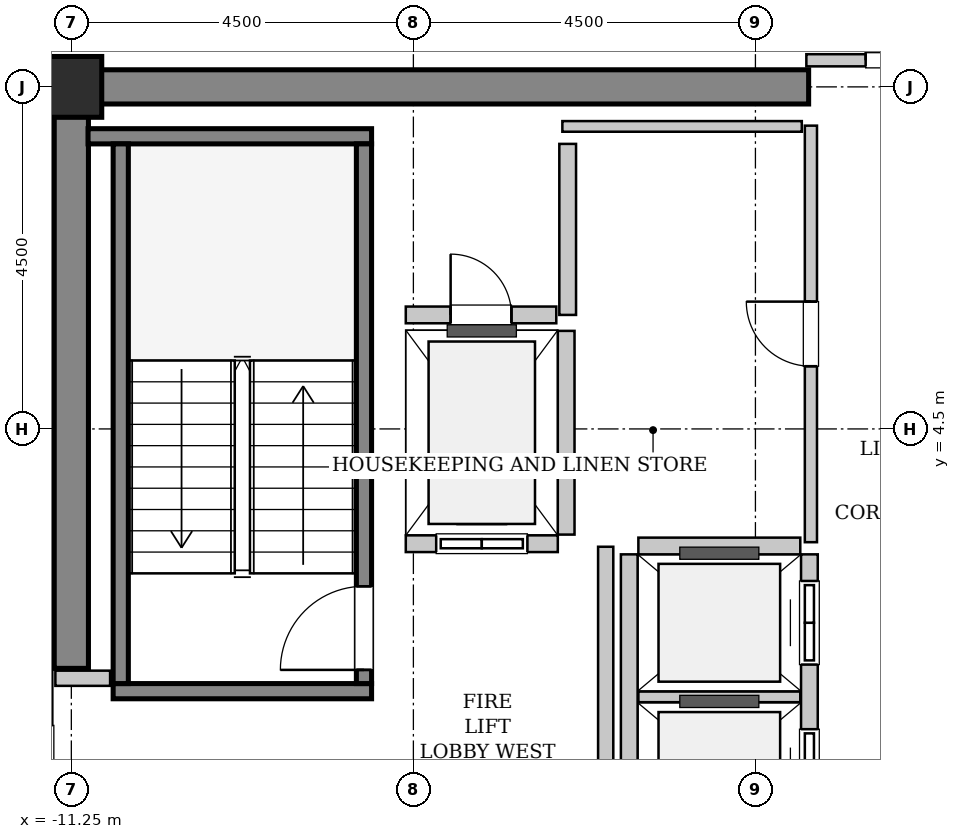
"""IFC4 building model, lengths in metres.
Left out: names, types, materials, properties, quantities, classifications, styles, units other than length and angle.
Written with IfcOpenShell. Run it as: python <this file> out.ifc"""

import sys

from ifc_helpers import new_model, si_unit, direction, frame, frame_2d, origin, origin_2d, place, context, subcontext, project, spatial, rectangle, hollow_rectangle, extrude, source, transform, mapped, element, fill, save


model = new_model("IFC4")
c1 = context("Model", 3, precision=1e-05, world=origin(), true_north=direction((0.0, 1.0)))
c2 = subcontext(c1, "Body", "Model", "MODEL_VIEW")
j1 = project(units=[si_unit("LENGTHUNIT", "METRE"), si_unit("PLANEANGLEUNIT", "RADIAN")], contexts=[c1])
p1 = place(None, origin())
s1 = spatial("IfcSite", under=j1, at=p1, CompositionType="ELEMENT")
p2 = place(p1, origin())
s2 = spatial("IfcBuilding", under=s1, at=p2, CompositionType="ELEMENT")
p3 = place(p2, frame((0.0, 0.0, 291.2)))
s3 = spatial("IfcBuildingStorey", under=s2, at=p3, CompositionType="ELEMENT", Elevation=291.2)
m1 = source(origin(), c2, "Body", "SweptSolid", [
    extrude(rectangle(XDim=9.925, YDim=0.45, at=frame_2d((4.962, 0.0))), origin(), (0.0, 0.0, 1.0), 3.8),
])
p4 = place(p3, frame((-11.475, 9.0, 0.0), z_axis=(0.0, 0.0, 1.0), x_axis=(1.0, 0.0, 0.0)))
e1 = element("IfcWall", 1, at=p4, inside=s3, PredefinedType="SHEAR", context=c2, shape_type="MappedRepresentation", body=[
    mapped(m1, transform((0.0, 0.0, 0.0), x_axis=(1.0, 0.0, 0.0), y_axis=(0.0, 1.0, 0.0), z_axis=(0.0, 0.0, 1.0), scale=1.0)),
])
m2 = source(origin(), c2, "Body", "SweptSolid", [
    extrude(rectangle(XDim=7.425, YDim=0.45, at=frame_2d((3.712, 0.0))), origin(), (0.0, 0.0, 1.0), 3.8),
])
p5 = place(p3, frame((-11.25, 1.35, 0.0), z_axis=(0.0, 0.0, 1.0), x_axis=(0.0, 1.0, 0.0)))
e2 = element("IfcWall", 2, at=p5, inside=s3, PredefinedType="SHEAR", context=c2, shape_type="MappedRepresentation", body=[
    mapped(m2, transform((0.0, 0.0, 0.0), x_axis=(1.0, 0.0, 0.0), y_axis=(0.0, 1.0, 0.0), z_axis=(0.0, 0.0, 1.0), scale=1.0)),
])
m3 = source(origin(), c2, "Body", "SweptSolid", [
    extrude(hollow_rectangle(XDim=0.8, YDim=0.8, WallThickness=0.04, InnerFilletRadius=0.04, OuterFilletRadius=0.08, at=origin_2d()), origin(), (0.0, 0.0, 1.0), 3.8),
])
p6 = place(p3, frame((-11.25, 9.0, 0.0), z_axis=(0.0, 0.0, 1.0), x_axis=(1.0, 0.0, 0.0)))
e3 = element("IfcColumn", 3, at=p6, inside=s3, PredefinedType="COLUMN", context=c2, shape_type="MappedRepresentation", body=[
    mapped(m3, transform((0.0, 0.0, 0.0), x_axis=(1.0, 0.0, 0.0), y_axis=(0.0, 1.0, 0.0), z_axis=(0.0, 0.0, 1.0), scale=1.0)),
])
m4 = source(origin(), c2, "Body", "SweptSolid", [
    extrude(rectangle(XDim=3.4, YDim=0.2, at=frame_2d((1.7, 0.0))), origin(), (0.0, 0.0, 1.0), 3.8),
])
p7 = place(p3, frame((-7.3, 1.05, 0.0), z_axis=(0.0, 0.0, 1.0), x_axis=(-1.0, 0.0, 0.0)))
e4 = element("IfcWall", 4, at=p7, inside=s3, PredefinedType="SOLIDWALL", context=c2, shape_type="MappedRepresentation", body=[
    mapped(m4, transform((0.0, 0.0, 0.0), x_axis=(1.0, 0.0, 0.0), y_axis=(0.0, 1.0, 0.0), z_axis=(0.0, 0.0, 1.0), scale=1.0)),
])
m5 = source(origin(), c2, "Body", "SweptSolid", [
    extrude(rectangle(XDim=3.73, YDim=0.2, at=frame_2d((1.865, 0.0))), origin(), (0.0, 0.0, 1.0), 3.8),
])
p8 = place(p3, frame((-7.3, 8.35, 0.0), z_axis=(0.0, 0.0, 1.0), x_axis=(-1.0, 0.0, 0.0)))
e5 = element("IfcWall", 5, at=p8, inside=s3, PredefinedType="SOLIDWALL", context=c2, shape_type="MappedRepresentation", body=[
    mapped(m5, transform((0.0, 0.0, 0.0), x_axis=(1.0, 0.0, 0.0), y_axis=(0.0, 1.0, 0.0), z_axis=(0.0, 0.0, 1.0), scale=1.0)),
])
m6 = source(origin(), c2, "Body", "SweptSolid", [
    extrude(rectangle(XDim=7.1, YDim=0.2, at=frame_2d((3.55, 0.0))), origin(), (0.0, 0.0, 1.0), 3.8),
])
p9 = place(p3, frame((-7.4, 1.15, 0.0), z_axis=(0.0, 0.0, 1.0), x_axis=(0.0, 1.0, 0.0)))
e6 = element("IfcWall", 6, at=p9, inside=s3, PredefinedType="SOLIDWALL", context=c2, shape_type="MappedRepresentation", body=[
    mapped(m6, transform((0.0, 0.0, 0.0), x_axis=(1.0, 0.0, 0.0), y_axis=(0.0, 1.0, 0.0), z_axis=(0.0, 0.0, 1.0), scale=1.0)),
])
p10 = place(p9, frame((0.18, 0.0, 0.0)))
e7 = element("IfcOpeningElement", 7, at=p10, cuts=e6, PredefinedType="OPENING", context=c2, shape_type="SweptSolid", body=[
    extrude(rectangle(XDim=1.1, YDim=2.15, at=frame_2d((0.55, 1.075))), frame((0.0, 0.11, 0.0), z_axis=(0.0, -1.0, 0.0), x_axis=(1.0, 0.0, 0.0)), (0.0, 0.0, 1.0), 0.22),
])
p11 = place(p3, frame((-10.6, 1.15, 0.0), z_axis=(0.0, 0.0, 1.0), x_axis=(0.0, 1.0, 0.0)))
e8 = element("IfcWall", 8, at=p11, inside=s3, PredefinedType="SOLIDWALL", context=c2, shape_type="MappedRepresentation", body=[
    mapped(m6, transform((0.0, 0.0, 0.0), x_axis=(1.0, 0.0, 0.0), y_axis=(0.0, 1.0, 0.0), z_axis=(0.0, 0.0, 1.0), scale=1.0)),
])
m7 = source(origin(), c2, "Body", "SweptSolid", [
    extrude(rectangle(XDim=2.0, YDim=0.22, at=frame_2d((1.0, 0.0))), origin(), (0.0, 0.0, 1.0), 3.535),
])
p12 = place(p3, frame((-6.85, 2.99, 0.0), z_axis=(0.0, 0.0, 1.0), x_axis=(1.0, 0.0, 0.0)))
e9 = element("IfcWall", 9, at=p12, inside=s3, PredefinedType="SOLIDWALL", context=c2, shape_type="MappedRepresentation", body=[
    mapped(m7, transform((0.0, 0.0, 0.0), x_axis=(1.0, 0.0, 0.0), y_axis=(0.0, 1.0, 0.0), z_axis=(0.0, 0.0, 1.0), scale=1.0)),
])
p13 = place(p12, frame((0.4, 0.0, 0.0)))
e10 = element("IfcOpeningElement", 10, at=p13, cuts=e9, PredefinedType="OPENING", context=c2, shape_type="SweptSolid", body=[
    extrude(rectangle(XDim=1.2, YDim=2.2, at=frame_2d((0.6, 1.1))), frame((0.0, 0.12, 0.0), z_axis=(0.0, -1.0, 0.0), x_axis=(1.0, 0.0, 0.0)), (0.0, 0.0, 1.0), 0.24),
])
m8 = source(origin(), c2, "Body", "SweptSolid", [
    extrude(rectangle(XDim=2.68, YDim=0.22, at=frame_2d((1.34, 0.0))), origin(), (0.0, 0.0, 1.0), 3.535),
])
p14 = place(p3, frame((-4.74, 3.11, 0.0), z_axis=(0.0, 0.0, 1.0), x_axis=(0.0, 1.0, 0.0)))
e11 = element("IfcWall", 11, at=p14, inside=s3, PredefinedType="SOLIDWALL", context=c2, shape_type="MappedRepresentation", body=[
    mapped(m8, transform((0.0, 0.0, 0.0), x_axis=(1.0, 0.0, 0.0), y_axis=(0.0, 1.0, 0.0), z_axis=(0.0, 0.0, 1.0), scale=1.0)),
])
m9 = source(origin(), c2, "Body", "SweptSolid", [
    extrude(rectangle(XDim=5.7, YDim=0.22, at=frame_2d((2.85, 0.0))), origin(), (0.0, 0.0, 1.0), 3.535),
])
p15 = place(p3, frame((-1.54, -2.85, 0.0), z_axis=(0.0, 0.0, 1.0), x_axis=(0.0, 1.0, 0.0)))
e12 = element("IfcWall", 12, at=p15, inside=s3, PredefinedType="SOLIDWALL", context=c2, shape_type="MappedRepresentation", body=[
    mapped(m9, transform((0.0, 0.0, 0.0), x_axis=(1.0, 0.0, 0.0), y_axis=(0.0, 1.0, 0.0), z_axis=(0.0, 0.0, 1.0), scale=1.0)),
])
p16 = place(p15, frame((0.35, 0.0, 0.0)))
e13 = element("IfcOpeningElement", 13, at=p16, cuts=e12, PredefinedType="OPENING", context=c2, shape_type="SweptSolid", body=[
    extrude(rectangle(XDim=1.1, YDim=2.2, at=frame_2d((0.55, 1.1))), frame((0.0, 0.12, 0.0), z_axis=(0.0, -1.0, 0.0), x_axis=(1.0, 0.0, 0.0)), (0.0, 0.0, 1.0), 0.24),
])
p17 = place(p15, frame((2.3, 0.0, 0.0)))
e14 = element("IfcOpeningElement", 14, at=p17, cuts=e12, PredefinedType="OPENING", context=c2, shape_type="SweptSolid", body=[
    extrude(rectangle(XDim=1.1, YDim=2.2, at=frame_2d((0.55, 1.1))), frame((0.0, 0.12, 0.0), z_axis=(0.0, -1.0, 0.0), x_axis=(1.0, 0.0, 0.0)), (0.0, 0.0, 1.0), 0.24),
])
p18 = place(p15, frame((4.25, 0.0, 0.0)))
e15 = element("IfcOpeningElement", 15, at=p18, cuts=e12, PredefinedType="OPENING", context=c2, shape_type="SweptSolid", body=[
    extrude(rectangle(XDim=1.1, YDim=2.2, at=frame_2d((0.55, 1.1))), frame((0.0, 0.12, 0.0), z_axis=(0.0, -1.0, 0.0), x_axis=(1.0, 0.0, 0.0)), (0.0, 0.0, 1.0), 0.24),
])
p19 = place(p3, frame((-3.91, 2.85, 0.0), z_axis=(0.0, 0.0, 1.0), x_axis=(0.0, -1.0, 0.0)))
e16 = element("IfcWall", 16, at=p19, inside=s3, PredefinedType="SOLIDWALL", context=c2, shape_type="MappedRepresentation", body=[
    mapped(m9, transform((0.0, 0.0, 0.0), x_axis=(1.0, 0.0, 0.0), y_axis=(0.0, 1.0, 0.0), z_axis=(0.0, 0.0, 1.0), scale=1.0)),
])
m10 = source(origin(), c2, "Body", "SweptSolid", [
    extrude(rectangle(XDim=2.13, YDim=0.14, at=frame_2d((1.065, 0.0))), origin(), (0.0, 0.0, 1.0), 3.535),
])
p20 = place(p3, frame((-3.79, 0.975, 0.0), z_axis=(0.0, 0.0, 1.0), x_axis=(1.0, 0.0, 0.0)))
e17 = element("IfcWall", 17, at=p20, inside=s3, PredefinedType="PARTITIONING", context=c2, shape_type="MappedRepresentation", body=[
    mapped(m10, transform((0.0, 0.0, 0.0), x_axis=(1.0, 0.0, 0.0), y_axis=(0.0, 1.0, 0.0), z_axis=(0.0, 0.0, 1.0), scale=1.0)),
])
m11 = source(origin(), c2, "Body", "SweptSolid", [
    extrude(rectangle(XDim=2.13, YDim=0.22, at=frame_2d((1.065, 0.0))), origin(), (0.0, 0.0, 1.0), 3.535),
])
p21 = place(p3, frame((-1.66, 2.96, 0.0), z_axis=(0.0, 0.0, 1.0), x_axis=(-1.0, 0.0, 0.0)))
e18 = element("IfcWall", 18, at=p21, inside=s3, PredefinedType="SOLIDWALL", context=c2, shape_type="MappedRepresentation", body=[
    mapped(m11, transform((0.0, 0.0, 0.0), x_axis=(1.0, 0.0, 0.0), y_axis=(0.0, 1.0, 0.0), z_axis=(0.0, 0.0, 1.0), scale=1.0)),
])
m12 = source(origin(), c2, "Body", "SweptSolid", [
    extrude(rectangle(XDim=2.25, YDim=0.22, at=frame_2d((1.125, 0.0))), origin(), (0.0, 0.0, 1.0), 3.535),
])
p22 = place(p3, frame((-4.72, 6.0, 0.0), z_axis=(0.0, 0.0, 1.0), x_axis=(0.0, 1.0, 0.0)))
e19 = element("IfcWall", 19, at=p22, inside=s3, PredefinedType="SOLIDWALL", context=c2, shape_type="MappedRepresentation", body=[
    mapped(m12, transform((0.0, 0.0, 0.0), x_axis=(1.0, 0.0, 0.0), y_axis=(0.0, 1.0, 0.0), z_axis=(0.0, 0.0, 1.0), scale=1.0)),
])
m13 = source(origin(), c2, "Body", "SweptSolid", [
    extrude(rectangle(XDim=1.98, YDim=0.22, at=frame_2d((0.99, 0.0))), origin(), (0.0, 0.0, 1.0), 3.535),
])
p23 = place(p3, frame((-6.85, 6.0, 0.0), z_axis=(0.0, 0.0, 1.0), x_axis=(1.0, 0.0, 0.0)))
e20 = element("IfcWall", 20, at=p23, inside=s3, PredefinedType="SOLIDWALL", context=c2, shape_type="MappedRepresentation", body=[
    mapped(m13, transform((0.0, 0.0, 0.0), x_axis=(1.0, 0.0, 0.0), y_axis=(0.0, 1.0, 0.0), z_axis=(0.0, 0.0, 1.0), scale=1.0)),
])
p24 = place(p23, frame((0.59, 0.0, 0.0)))
e21 = element("IfcOpeningElement", 21, at=p24, cuts=e20, PredefinedType="OPENING", context=c2, shape_type="SweptSolid", body=[
    extrude(rectangle(XDim=0.8, YDim=2.0, at=frame_2d((0.4, 1.0))), frame((0.0, 0.12, 0.0), z_axis=(0.0, -1.0, 0.0), x_axis=(1.0, 0.0, 0.0)), (0.0, 0.0, 1.0), 0.24),
])
m14 = source(origin(), c2, "Body", "SweptSolid", [
    extrude(rectangle(XDim=5.9, YDim=0.2, at=frame_2d((2.95, 0.0))), origin(), (0.0, 0.0, 1.0), 3.535),
])
p25 = place(p3, frame((-4.22, -2.95, 0.0), z_axis=(0.0, 0.0, 1.0), x_axis=(0.0, 1.0, 0.0)))
e22 = element("IfcWall", 22, at=p25, inside=s3, PredefinedType="PARTITIONING", context=c2, shape_type="MappedRepresentation", body=[
    mapped(m14, transform((0.0, 0.0, 0.0), x_axis=(1.0, 0.0, 0.0), y_axis=(0.0, 1.0, 0.0), z_axis=(0.0, 0.0, 1.0), scale=1.0)),
])
m15 = source(origin(), c2, "Body", "SweptSolid", [
    extrude(rectangle(XDim=0.72, YDim=0.2, at=frame_2d((0.36, 0.0))), origin(), (0.0, 0.0, 1.0), 3.535),
])
p26 = place(p3, frame((-11.46, 1.22, 0.0), z_axis=(0.0, 0.0, 1.0), x_axis=(1.0, 0.0, 0.0)))
e23 = element("IfcWall", 23, at=p26, inside=s3, PredefinedType="PARTITIONING", context=c2, shape_type="MappedRepresentation", body=[
    mapped(m15, transform((0.0, 0.0, 0.0), x_axis=(1.0, 0.0, 0.0), y_axis=(0.0, 1.0, 0.0), z_axis=(0.0, 0.0, 1.0), scale=1.0)),
])
m16 = source(origin(), c2, "Body", "SweptSolid", [
    extrude(rectangle(XDim=3.16, YDim=0.16, at=frame_2d((1.58, 0.0))), origin(), (0.0, 0.0, 1.0), 2.625),
])
p27 = place(p3, frame((-1.58, 9.35, 0.0), z_axis=(0.0, 0.0, 1.0), x_axis=(1.0, 0.0, 0.0)))
e24 = element("IfcWall", 24, at=p27, inside=s3, PredefinedType="PARTITIONING", context=c2, shape_type="MappedRepresentation", body=[
    mapped(m16, transform((0.0, 0.0, 0.0), x_axis=(1.0, 0.0, 0.0), y_axis=(0.0, 1.0, 0.0), z_axis=(0.0, 0.0, 1.0), scale=1.0)),
])
p28 = place(p27, frame((0.78, 0.0, 0.0)))
e25 = element("IfcOpeningElement", 25, at=p28, cuts=e24, PredefinedType="OPENING", context=c2, shape_type="SweptSolid", body=[
    extrude(rectangle(XDim=1.6, YDim=2.3, at=frame_2d((0.8, 1.15))), frame((0.0, 0.09, 0.0), z_axis=(0.0, -1.0, 0.0), x_axis=(1.0, 0.0, 0.0)), (0.0, 0.0, 1.0), 0.18),
])
m17 = source(origin(), c2, "Body", "SweptSolid", [
    extrude(rectangle(XDim=5.48, YDim=0.16, at=frame_2d((2.74, 0.0))), origin(), (0.0, 0.0, 1.0), 3.535),
])
p29 = place(p3, frame((-1.52, 3.01, 0.0), z_axis=(0.0, 0.0, 1.0), x_axis=(0.0, 1.0, 0.0)))
e26 = element("IfcWall", 26, at=p29, inside=s3, PredefinedType="PARTITIONING", context=c2, shape_type="MappedRepresentation", body=[
    mapped(m17, transform((0.0, 0.0, 0.0), x_axis=(1.0, 0.0, 0.0), y_axis=(0.0, 1.0, 0.0), z_axis=(0.0, 0.0, 1.0), scale=1.0)),
])
p30 = place(p29, frame((2.315, 0.0, 0.0)))
e27 = element("IfcOpeningElement", 27, at=p30, cuts=e26, PredefinedType="OPENING", context=c2, shape_type="SweptSolid", body=[
    extrude(rectangle(XDim=0.85, YDim=2.1, at=frame_2d((0.425, 1.05))), frame((0.0, 0.09, 0.0), z_axis=(0.0, -1.0, 0.0), x_axis=(1.0, 0.0, 0.0)), (0.0, 0.0, 1.0), 0.18),
])
m18 = source(origin(), c2, "Body", "SweptSolid", [
    extrude(rectangle(XDim=3.15, YDim=0.14, at=frame_2d((1.575, 0.0))), origin(), (0.0, 0.0, 1.0), 3.535),
])
p31 = place(p3, frame((-4.79, 8.48, 0.0), z_axis=(0.0, 0.0, 1.0), x_axis=(1.0, 0.0, 0.0)))
e28 = element("IfcWall", 28, at=p31, inside=s3, PredefinedType="PARTITIONING", context=c2, shape_type="MappedRepresentation", body=[
    mapped(m18, transform((0.0, 0.0, 0.0), x_axis=(1.0, 0.0, 0.0), y_axis=(0.0, 1.0, 0.0), z_axis=(0.0, 0.0, 1.0), scale=1.0)),
])
m19 = source(origin(), c2, "Body", "SweptSolid", [
    extrude(rectangle(XDim=1.1, YDim=2.15, at=frame_2d((0.55, 1.075))), frame((0.0, 0.025, 0.0), z_axis=(0.0, -1.0, 0.0), x_axis=(1.0, 0.0, 0.0)), (0.0, 0.0, 1.0), 0.05),
])
p32 = place(p10, origin())
e29 = element("IfcDoor", 29, at=p32, inside=s3, OperationType="SINGLE_SWING_LEFT", PredefinedType="DOOR", context=c2, shape_type="MappedRepresentation", body=[
    mapped(m19, transform((0.0, 0.0, 0.0), x_axis=(1.0, 0.0, 0.0), y_axis=(0.0, 1.0, 0.0), z_axis=(0.0, 0.0, 1.0), scale=1.0)),
])
fill(e7, e29)
m20 = source(origin(), c2, "Body", "SweptSolid", [
    extrude(rectangle(XDim=1.2, YDim=2.2, at=frame_2d((0.6, 1.1))), frame((0.0, 0.025, 0.0), z_axis=(0.0, -1.0, 0.0), x_axis=(1.0, 0.0, 0.0)), (0.0, 0.0, 1.0), 0.05),
])
p33 = place(p13, origin())
e30 = element("IfcDoor", 30, at=p33, inside=s3, OperationType="SLIDING_TO_LEFT", PredefinedType="DOOR", context=c2, shape_type="MappedRepresentation", body=[
    mapped(m20, transform((0.0, 0.0, 0.0), x_axis=(1.0, 0.0, 0.0), y_axis=(0.0, 1.0, 0.0), z_axis=(0.0, 0.0, 1.0), scale=1.0)),
])
fill(e10, e30)
m21 = source(origin(), c2, "Body", "SweptSolid", [
    extrude(rectangle(XDim=1.1, YDim=2.2, at=frame_2d((0.55, 1.1))), frame((0.0, 0.025, 0.0), z_axis=(0.0, -1.0, 0.0), x_axis=(1.0, 0.0, 0.0)), (0.0, 0.0, 1.0), 0.05),
])
p34 = place(p17, origin())
e31 = element("IfcDoor", 31, at=p34, inside=s3, OperationType="DOUBLE_DOOR_SLIDING", PredefinedType="DOOR", context=c2, shape_type="MappedRepresentation", body=[
    mapped(m21, transform((0.0, 0.0, 0.0), x_axis=(1.0, 0.0, 0.0), y_axis=(0.0, 1.0, 0.0), z_axis=(0.0, 0.0, 1.0), scale=1.0)),
])
fill(e14, e31)
p35 = place(p18, origin())
e32 = element("IfcDoor", 32, at=p35, inside=s3, OperationType="DOUBLE_DOOR_SLIDING", PredefinedType="DOOR", context=c2, shape_type="MappedRepresentation", body=[
    mapped(m21, transform((0.0, 0.0, 0.0), x_axis=(1.0, 0.0, 0.0), y_axis=(0.0, 1.0, 0.0), z_axis=(0.0, 0.0, 1.0), scale=1.0)),
])
fill(e15, e32)
m22 = source(origin(), c2, "Body", "SweptSolid", [
    extrude(rectangle(XDim=0.8, YDim=2.0, at=frame_2d((0.4, 1.0))), frame((0.0, 0.025, 0.0), z_axis=(0.0, -1.0, 0.0), x_axis=(1.0, 0.0, 0.0)), (0.0, 0.0, 1.0), 0.05),
])
p36 = place(p24, origin())
e33 = element("IfcDoor", 33, at=p36, inside=s3, OperationType="SINGLE_SWING_LEFT", PredefinedType="TRAPDOOR", context=c2, shape_type="MappedRepresentation", body=[
    mapped(m22, transform((0.0, 0.0, 0.0), x_axis=(1.0, 0.0, 0.0), y_axis=(0.0, 1.0, 0.0), z_axis=(0.0, 0.0, 1.0), scale=1.0)),
])
fill(e21, e33)
m23 = source(origin(), c2, "Body", "SweptSolid", [
    extrude(rectangle(XDim=1.6, YDim=2.3, at=frame_2d((0.8, 1.15))), frame((0.0, 0.025, 0.0), z_axis=(0.0, -1.0, 0.0), x_axis=(1.0, 0.0, 0.0)), (0.0, 0.0, 1.0), 0.05),
])
p37 = place(p28, origin())
e34 = element("IfcDoor", 34, at=p37, inside=s3, OperationType="DOUBLE_DOOR_SINGLE_SWING", PredefinedType="DOOR", context=c2, shape_type="MappedRepresentation", body=[
    mapped(m23, transform((0.0, 0.0, 0.0), x_axis=(1.0, 0.0, 0.0), y_axis=(0.0, 1.0, 0.0), z_axis=(0.0, 0.0, 1.0), scale=1.0)),
])
fill(e25, e34)
m24 = source(origin(), c2, "Body", "SweptSolid", [
    extrude(rectangle(XDim=0.85, YDim=2.1, at=frame_2d((0.425, 1.05))), frame((0.0, 0.025, 0.0), z_axis=(0.0, -1.0, 0.0), x_axis=(1.0, 0.0, 0.0)), (0.0, 0.0, 1.0), 0.05),
])
p38 = place(p30, origin())
e35 = element("IfcDoor", 35, at=p38, inside=s3, OperationType="SINGLE_SWING_RIGHT", PredefinedType="DOOR", context=c2, shape_type="MappedRepresentation", body=[
    mapped(m24, transform((0.0, 0.0, 0.0), x_axis=(1.0, 0.0, 0.0), y_axis=(0.0, 1.0, 0.0), z_axis=(0.0, 0.0, 1.0), scale=1.0)),
])
fill(e27, e35)
save(model, sys.argv[1])
